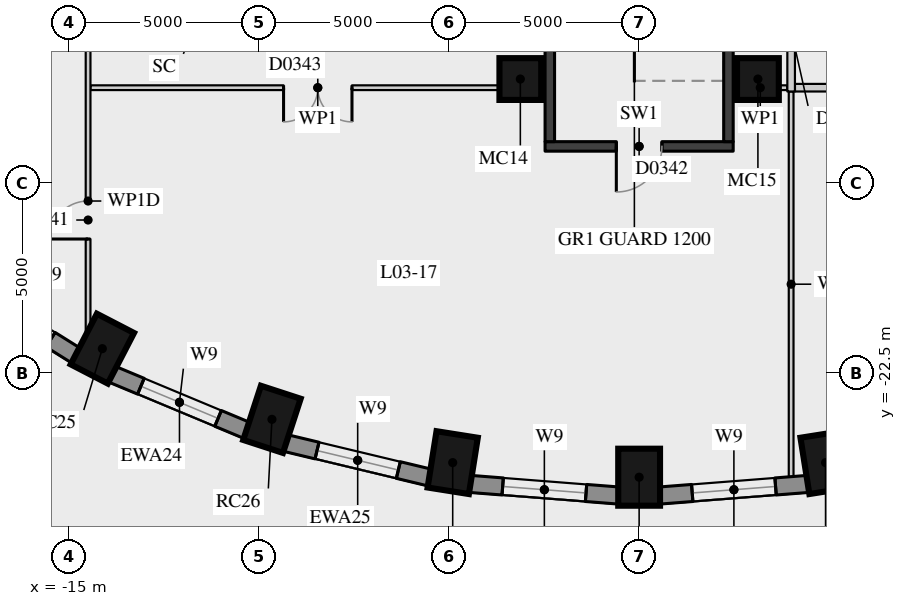
"""IFC4 building model, lengths in metres.
Left out: names, types, materials, properties, quantities, classifications, styles, units other than length and angle.
Written with IfcOpenShell. Run it as: python <this file> out.ifc"""

import sys

from ifc_helpers import new_model, si_unit, direction, frame, frame_2d, origin, origin_2d, place, context, subcontext, project, spatial, rectangle, extrude, element, fill, save


model = new_model("IFC4")
c1 = context("Model", 3, precision=1e-05, world=origin(), true_north=direction((0.0, 1.0)))
c2 = subcontext(c1, "Body", "Model", "MODEL_VIEW")
j1 = project(units=[si_unit("LENGTHUNIT", "METRE"), si_unit("PLANEANGLEUNIT", "RADIAN")], contexts=[c1])
p1 = place(None, origin())
s1 = spatial("IfcSite", under=j1, at=p1, CompositionType="ELEMENT")
p2 = place(p1, origin())
s2 = spatial("IfcBuilding", under=s1, at=p2, CompositionType="ELEMENT")
p3 = place(p2, frame((0.0, 0.0, 17.5)))
s3 = spatial("IfcBuildingStorey", under=s2, at=p3, CompositionType="ELEMENT", Elevation=17.5)
for number, where, z_axis, x_axis in (
    (1, (-14.125, -21.867, 0.0), (0.0, 0.0, 1.0), (-0.46, -0.888, 0.0)),
    (2, (-9.662, -23.727, 0.0), (0.0, 0.0, 1.0), (-0.31, -0.951, 0.0)),
    (3, (-4.906, -24.866, 0.0), (0.0, 0.0, 1.0), (-0.156, -0.988, 0.0)),
    (4, (0.0, -25.25, 0.0), (0.0, 0.0, 1.0), (0.0, -1.0, 0.0)),
    (5, (4.906, -24.866, 0.0), (0.0, 0.0, 1.0), (0.156, -0.988, 0.0)),
):
    element("IfcColumn", number, at=place(p3, frame(where, z_axis=z_axis, x_axis=x_axis)), inside=s3, PredefinedType="COLUMN", context=c2, shape_type="SweptSolid", body=[
        extrude(rectangle(XDim=1.5, YDim=1.1, at=origin_2d()), origin(), (0.0, 0.0, 1.0), 4.2),
    ])
for number, where, z_axis, x_axis in (
    (6, (-3.126, -14.772, 0.0), (0.0, 0.0, 1.0), (1.0, 0.0, 0.0)),
    (7, (3.126, -14.772, 0.0), (0.0, 0.0, 1.0), (1.0, 0.0, 0.0)),
):
    element("IfcColumn", number, at=place(p3, frame(where, z_axis=z_axis, x_axis=x_axis)), inside=s3, PredefinedType="COLUMN", context=c2, shape_type="SweptSolid", body=[
        extrude(rectangle(XDim=1.1, YDim=1.1, at=origin_2d()), origin(), (0.0, 0.0, 1.0), 4.2),
    ])
p4 = place(p3, frame((-18.023, -20.044, 0.0), z_axis=(0.0, 0.0, 1.0), x_axis=(0.847635480093, -0.530579016629, 0.0)))
e8 = element("IfcWall", 8, at=p4, inside=s3, PredefinedType="SOLIDWALL", context=c2, shape_type="SweptSolid", body=[
    extrude(rectangle(XDim=3.782, YDim=0.45, at=frame_2d((1.891, 0.0))), origin(), (0.0, 0.0, 1.0), 3.92),
])
p5 = place(p4, frame((0.791, 0.0, 0.4)))
e9 = element("IfcOpeningElement", 9, at=p5, cuts=e8, PredefinedType="OPENING", context=c2, shape_type="SweptSolid", body=[
    extrude(rectangle(XDim=2.2, YDim=2.8, at=frame_2d((1.1, 1.4))), frame((0.0, 0.235, 0.0), z_axis=(0.0, -1.0, 0.0), x_axis=(1.0, 0.0, 0.0)), (0.0, 0.0, 1.0), 0.47),
])
p6 = place(p3, frame((-13.875, -22.537, 0.0), z_axis=(0.0, 0.0, 1.0), x_axis=(0.923031964282, -0.384723267966, 0.0)))
e10 = element("IfcWall", 10, at=p6, inside=s3, PredefinedType="SOLIDWALL", context=c2, shape_type="SweptSolid", body=[
    extrude(rectangle(XDim=3.856, YDim=0.45, at=frame_2d((1.928, 0.0))), origin(), (0.0, 0.0, 1.0), 3.92),
])
p7 = place(p6, frame((0.828, 0.0, 0.4)))
e11 = element("IfcOpeningElement", 11, at=p7, cuts=e10, PredefinedType="OPENING", context=c2, shape_type="SweptSolid", body=[
    extrude(rectangle(XDim=2.2, YDim=2.8, at=frame_2d((1.1, 1.4))), frame((0.0, 0.235, 0.0), z_axis=(0.0, -1.0, 0.0), x_axis=(1.0, 0.0, 0.0)), (0.0, 0.0, 1.0), 0.47),
])
p8 = place(p3, frame((-9.308, -24.35, 0.0), z_axis=(0.0, 0.0, 1.0), x_axis=(0.972496561493, -0.232917233979, 0.0)))
e12 = element("IfcWall", 12, at=p8, inside=s3, PredefinedType="SOLIDWALL", context=c2, shape_type="SweptSolid", body=[
    extrude(rectangle(XDim=3.911, YDim=0.45, at=frame_2d((1.956, 0.0))), origin(), (0.0, 0.0, 1.0), 3.92),
])
p9 = place(p8, frame((0.855, 0.0, 0.4)))
e13 = element("IfcOpeningElement", 13, at=p9, cuts=e12, PredefinedType="OPENING", context=c2, shape_type="SweptSolid", body=[
    extrude(rectangle(XDim=2.2, YDim=2.8, at=frame_2d((1.1, 1.4))), frame((0.0, 0.235, 0.0), z_axis=(0.0, -1.0, 0.0), x_axis=(1.0, 0.0, 0.0)), (0.0, 0.0, 1.0), 0.47),
])
p10 = place(p3, frame((-4.457, -25.426, 0.0), z_axis=(0.0, 0.0, 1.0), x_axis=(0.996955972145, -0.077966592873, 0.0)))
e14 = element("IfcWall", 14, at=p10, inside=s3, PredefinedType="SOLIDWALL", context=c2, shape_type="SweptSolid", body=[
    extrude(rectangle(XDim=3.939, YDim=0.45, at=frame_2d((1.97, 0.0))), origin(), (0.0, 0.0, 1.0), 3.92),
])
p11 = place(p10, frame((0.87, 0.0, 0.4)))
e15 = element("IfcOpeningElement", 15, at=p11, cuts=e14, PredefinedType="OPENING", context=c2, shape_type="SweptSolid", body=[
    extrude(rectangle(XDim=2.2, YDim=2.8, at=frame_2d((1.1, 1.4))), frame((0.0, 0.235, 0.0), z_axis=(0.0, -1.0, 0.0), x_axis=(1.0, 0.0, 0.0)), (0.0, 0.0, 1.0), 0.47),
])
p12 = place(p3, frame((0.53, -25.733, 0.0), z_axis=(0.0, 0.0, 1.0), x_axis=(0.996955972145, 0.077966592873, 0.0)))
e16 = element("IfcWall", 16, at=p12, inside=s3, PredefinedType="SOLIDWALL", context=c2, shape_type="SweptSolid", body=[
    extrude(rectangle(XDim=3.939, YDim=0.45, at=frame_2d((1.97, 0.0))), origin(), (0.0, 0.0, 1.0), 3.92),
])
p13 = place(p12, frame((0.87, 0.0, 0.4)))
e17 = element("IfcOpeningElement", 17, at=p13, cuts=e16, PredefinedType="OPENING", context=c2, shape_type="SweptSolid", body=[
    extrude(rectangle(XDim=2.2, YDim=2.8, at=frame_2d((1.1, 1.4))), frame((0.0, 0.235, 0.0), z_axis=(0.0, -1.0, 0.0), x_axis=(1.0, 0.0, 0.0)), (0.0, 0.0, 1.0), 0.47),
])
p14 = place(p3, frame((-2.475, -16.545, 0.0), z_axis=(0.0, 0.0, 1.0), x_axis=(1.0, 0.0, 0.0)))
e18 = element("IfcWall", 18, at=p14, inside=s3, PredefinedType="SOLIDWALL", context=c2, shape_type="SweptSolid", body=[
    extrude(rectangle(XDim=4.95, YDim=0.25, at=frame_2d((2.475, 0.0))), origin(), (0.0, 0.0, 1.0), 3.92),
])
p15 = place(p14, frame((1.875, 0.0, 0.0)))
e19 = element("IfcOpeningElement", 19, at=p15, cuts=e18, PredefinedType="OPENING", context=c2, shape_type="SweptSolid", body=[
    extrude(rectangle(XDim=1.2, YDim=2.1, at=frame_2d((0.6, 1.05))), frame((0.0, 0.135, 0.0), z_axis=(0.0, -1.0, 0.0), x_axis=(1.0, 0.0, 0.0)), (0.0, 0.0, 1.0), 0.27),
])
p16 = place(p3, frame((-14.438, -15.0, 0.0), z_axis=(0.0, 0.0, 1.0), x_axis=(1.0, 0.0, 0.0)))
e20 = element("IfcWall", 20, at=p16, inside=s3, PredefinedType="PARTITIONING", context=c2, shape_type="SweptSolid", body=[
    extrude(rectangle(XDim=11.962, YDim=0.125, at=frame_2d((5.981, 0.0))), origin(), (0.0, 0.0, 1.0), 3.92),
])
p17 = place(p16, frame((5.082, 0.0, 0.0)))
e21 = element("IfcOpeningElement", 21, at=p17, cuts=e20, PredefinedType="OPENING", context=c2, shape_type="SweptSolid", body=[
    extrude(rectangle(XDim=1.8, YDim=2.1, at=frame_2d((0.9, 1.05))), frame((0.0, 0.073, 0.0), z_axis=(0.0, -1.0, 0.0), x_axis=(1.0, 0.0, 0.0)), (0.0, 0.0, 1.0), 0.145),
])
p18 = place(p3, frame((2.475, -15.0, 0.0), z_axis=(0.0, 0.0, 1.0), x_axis=(1.0, 0.0, 0.0)))
e22 = element("IfcWall", 22, at=p18, inside=s3, PredefinedType="PARTITIONING", context=c2, shape_type="SweptSolid", body=[
    extrude(rectangle(XDim=1.425, YDim=0.125, at=frame_2d((0.712, 0.0))), origin(), (0.0, 0.0, 1.0), 3.92),
])
p19 = place(p3, frame((4.1, -15.0, 0.0), z_axis=(0.0, 0.0, 1.0), x_axis=(1.0, 0.0, 0.0)))
e23 = element("IfcWall", 23, at=p19, inside=s3, PredefinedType="PARTITIONING", context=c2, shape_type="SweptSolid", body=[
    extrude(rectangle(XDim=18.962, YDim=0.2, at=frame_2d((9.481, 0.0))), origin(), (0.0, 0.0, 1.0), 3.92),
])
p20 = place(p19, frame((3.5, 0.0, 0.0)))
e24 = element("IfcOpeningElement", 24, at=p20, cuts=e23, PredefinedType="OPENING", context=c2, shape_type="SweptSolid", body=[
    extrude(rectangle(XDim=1.0, YDim=2.1, at=frame_2d((0.5, 1.05))), frame((0.0, 0.11, 0.0), z_axis=(0.0, -1.0, 0.0), x_axis=(1.0, 0.0, 0.0)), (0.0, 0.0, 1.0), 0.22),
])
p21 = place(p19, frame((10.0, 0.0, 0.0)))
e25 = element("IfcOpeningElement", 25, at=p21, cuts=e23, PredefinedType="OPENING", context=c2, shape_type="SweptSolid", body=[
    extrude(rectangle(XDim=1.0, YDim=2.1, at=frame_2d((0.5, 1.05))), frame((0.0, 0.11, 0.0), z_axis=(0.0, -1.0, 0.0), x_axis=(1.0, 0.0, 0.0)), (0.0, 0.0, 1.0), 0.22),
])
p22 = place(p3, frame((-14.5, -22.027, 0.0), z_axis=(0.0, 0.0, 1.0), x_axis=(0.0, 1.0, 0.0)))
e26 = element("IfcWall", 26, at=p22, inside=s3, PredefinedType="PARTITIONING", context=c2, shape_type="SweptSolid", body=[
    extrude(rectangle(XDim=8.089, YDim=0.125, at=frame_2d((4.045, 0.0))), origin(), (0.0, 0.0, 1.0), 3.47),
])
p23 = place(p22, frame((3.045, 0.0, 0.0)))
e27 = element("IfcOpeningElement", 27, at=p23, cuts=e26, PredefinedType="OPENING", context=c2, shape_type="SweptSolid", body=[
    extrude(rectangle(XDim=1.0, YDim=2.1, at=frame_2d((0.5, 1.05))), frame((0.0, 0.073, 0.0), z_axis=(0.0, -1.0, 0.0), x_axis=(1.0, 0.0, 0.0)), (0.0, 0.0, 1.0), 0.145),
])
p24 = place(p3, frame((-2.35, -16.42, 0.0), z_axis=(0.0, 0.0, 1.0), x_axis=(0.0, 1.0, 0.0)))
e28 = element("IfcWall", 28, at=p24, inside=s3, PredefinedType="SOLIDWALL", context=c2, shape_type="SweptSolid", body=[
    extrude(rectangle(XDim=9.87, YDim=0.25, at=frame_2d((4.935, 0.0))), origin(), (0.0, 0.0, 1.0), 3.92),
])
p25 = place(p3, frame((2.35, -16.42, 0.0), z_axis=(0.0, 0.0, 1.0), x_axis=(0.0, 1.0, 0.0)))
e29 = element("IfcWall", 29, at=p25, inside=s3, PredefinedType="SOLIDWALL", context=c2, shape_type="SweptSolid", body=[
    extrude(rectangle(XDim=9.02, YDim=0.25, at=frame_2d((4.51, 0.0))), origin(), (0.0, 0.0, 1.0), 3.92),
])
p26 = place(p3, frame((4.0, -25.242, 0.0), z_axis=(0.0, 0.0, 1.0), x_axis=(0.0, 1.0, 0.0)))
e30 = element("IfcWall", 30, at=p26, inside=s3, PredefinedType="PARTITIONING", context=c2, shape_type="SweptSolid", body=[
    extrude(rectangle(XDim=10.142, YDim=0.125, at=frame_2d((5.071, 0.0))), origin(), (0.0, 0.0, 1.0), 3.92),
])
p27 = place(p3, frame((4.0, -15.1, 0.0), z_axis=(0.0, 0.0, 1.0), x_axis=(0.0, 1.0, 0.0)))
e31 = element("IfcWall", 31, at=p27, inside=s3, PredefinedType="PARTITIONING", context=c2, shape_type="SweptSolid", body=[
    extrude(rectangle(XDim=3.2, YDim=0.2, at=frame_2d((1.6, 0.0))), origin(), (0.0, 0.0, 1.0), 3.92),
])
p28 = place(p27, frame((1.1, 0.0, 0.0)))
e32 = element("IfcOpeningElement", 32, at=p28, cuts=e31, PredefinedType="OPENING", context=c2, shape_type="SweptSolid", body=[
    extrude(rectangle(XDim=1.0, YDim=2.1, at=frame_2d((0.5, 1.05))), frame((0.0, 0.11, 0.0), z_axis=(0.0, -1.0, 0.0), x_axis=(1.0, 0.0, 0.0)), (0.0, 0.0, 1.0), 0.22),
])
p29 = place(p7, origin())
e33 = element("IfcWindow", 33, at=p29, inside=s3, PartitioningType="SINGLE_PANEL", PredefinedType="WINDOW", context=c2, shape_type="SweptSolid", body=[
    extrude(rectangle(XDim=2.2, YDim=2.8, at=frame_2d((1.1, 1.4))), frame((0.0, 0.035, 0.0), z_axis=(0.0, -1.0, 0.0), x_axis=(1.0, 0.0, 0.0)), (0.0, 0.0, 1.0), 0.06),
])
fill(e11, e33)
p30 = place(p9, origin())
e34 = element("IfcWindow", 34, at=p30, inside=s3, PartitioningType="SINGLE_PANEL", PredefinedType="WINDOW", context=c2, shape_type="SweptSolid", body=[
    extrude(rectangle(XDim=2.2, YDim=2.8, at=frame_2d((1.1, 1.4))), frame((0.0, 0.035, 0.0), z_axis=(0.0, -1.0, 0.0), x_axis=(1.0, 0.0, 0.0)), (0.0, 0.0, 1.0), 0.06),
])
fill(e13, e34)
p31 = place(p11, origin())
e35 = element("IfcWindow", 35, at=p31, inside=s3, PartitioningType="SINGLE_PANEL", PredefinedType="WINDOW", context=c2, shape_type="SweptSolid", body=[
    extrude(rectangle(XDim=2.2, YDim=2.8, at=frame_2d((1.1, 1.4))), frame((0.0, 0.035, 0.0), z_axis=(0.0, -1.0, 0.0), x_axis=(1.0, 0.0, 0.0)), (0.0, 0.0, 1.0), 0.06),
])
fill(e15, e35)
p32 = place(p13, origin())
e36 = element("IfcWindow", 36, at=p32, inside=s3, PartitioningType="SINGLE_PANEL", PredefinedType="WINDOW", context=c2, shape_type="SweptSolid", body=[
    extrude(rectangle(XDim=2.2, YDim=2.8, at=frame_2d((1.1, 1.4))), frame((0.0, 0.035, 0.0), z_axis=(0.0, -1.0, 0.0), x_axis=(1.0, 0.0, 0.0)), (0.0, 0.0, 1.0), 0.06),
])
fill(e17, e36)
p33 = place(p23, origin())
e37 = element("IfcDoor", 37, at=p33, inside=s3, OperationType="SINGLE_SWING_LEFT", PredefinedType="DOOR", context=c2, shape_type="SweptSolid", body=[
    extrude(rectangle(XDim=1.0, YDim=2.1, at=frame_2d((0.5, 1.05))), frame((0.0, 0.025, 0.0), z_axis=(0.0, -1.0, 0.0), x_axis=(1.0, 0.0, 0.0)), (0.0, 0.0, 1.0), 0.05),
])
fill(e27, e37)
p34 = place(p17, origin())
e38 = element("IfcDoor", 38, at=p34, inside=s3, OperationType="DOUBLE_DOOR_SINGLE_SWING", PredefinedType="DOOR", context=c2, shape_type="SweptSolid", body=[
    extrude(rectangle(XDim=1.8, YDim=2.1, at=frame_2d((0.9, 1.05))), frame((0.0, 0.025, 0.0), z_axis=(0.0, -1.0, 0.0), x_axis=(1.0, 0.0, 0.0)), (0.0, 0.0, 1.0), 0.05),
])
fill(e21, e38)
p35 = place(p15, origin())
e39 = element("IfcDoor", 39, at=p35, inside=s3, OperationType="SINGLE_SWING_RIGHT", PredefinedType="DOOR", context=c2, shape_type="SweptSolid", body=[
    extrude(rectangle(XDim=1.2, YDim=2.1, at=frame_2d((0.6, 1.05))), frame((0.0, 0.025, 0.0), z_axis=(0.0, -1.0, 0.0), x_axis=(1.0, 0.0, 0.0)), (0.0, 0.0, 1.0), 0.05),
])
fill(e19, e39)
save(model, sys.argv[1])
